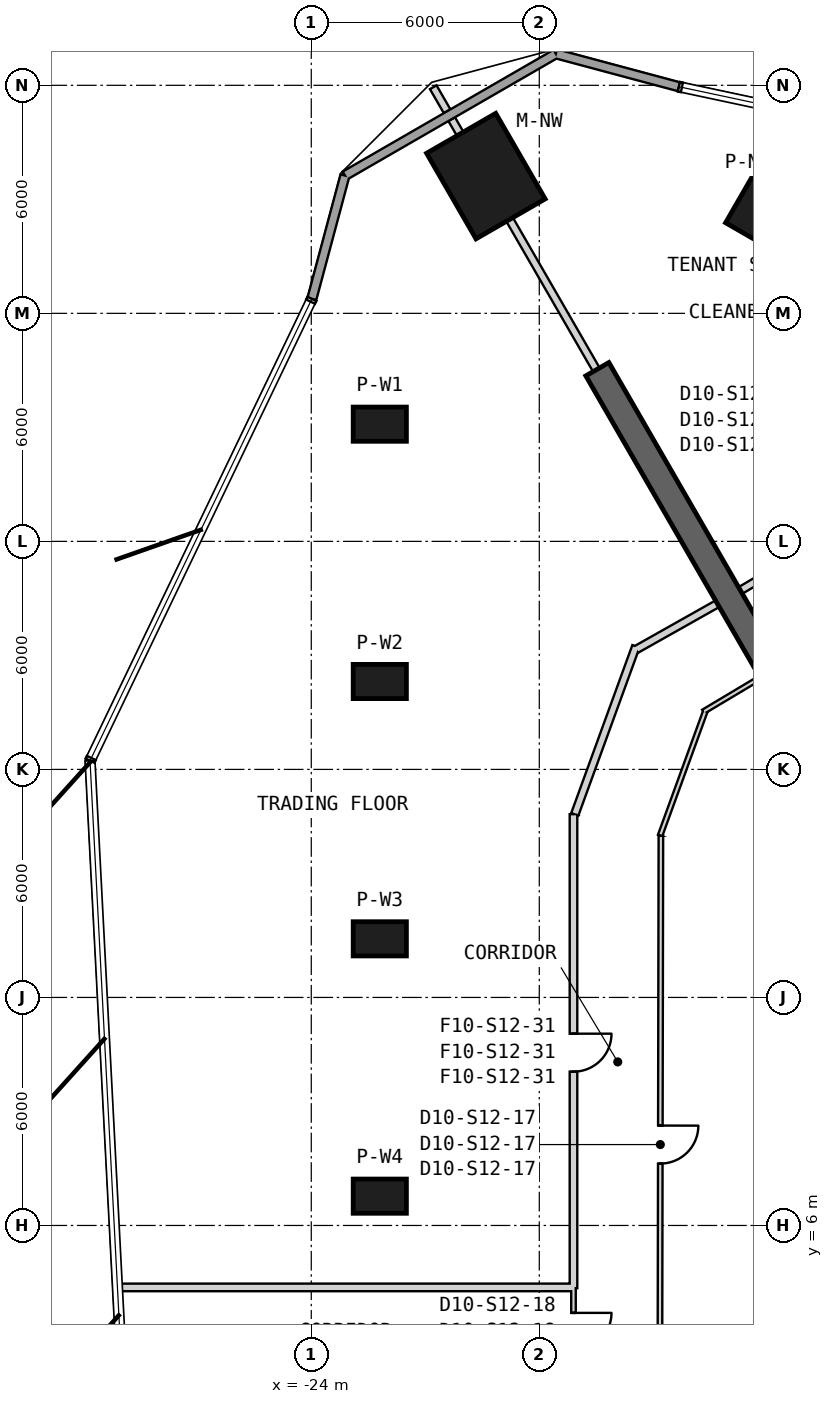
"""IFC4 building model, lengths in metres.
Left out: names, types, materials, properties, quantities, classifications, styles, units other than length and angle.
Written with IfcOpenShell. Run it as: python <this file> out.ifc"""

import sys

from ifc_helpers import new_model, si_unit, direction, frame, frame_2d, origin, origin_2d, place, context, subcontext, project, spatial, rectangle, extrude, element, fill, save


model = new_model("IFC4")
c1 = context("Model", 3, precision=1e-05, world=origin(), true_north=direction((0.0, 1.0)))
c2 = subcontext(c1, "Body", "Model", "MODEL_VIEW")
j1 = project(units=[si_unit("LENGTHUNIT", "METRE"), si_unit("PLANEANGLEUNIT", "RADIAN")], contexts=[c1])
p1 = place(None, origin())
s1 = spatial("IfcSite", under=j1, at=p1, CompositionType="ELEMENT")
p2 = place(p1, origin())
s2 = spatial("IfcBuilding", under=s1, at=p2, CompositionType="ELEMENT")
p3 = place(p2, frame((0.0, 0.0, 205.2)))
s3 = spatial("IfcBuildingStorey", under=s2, at=p3, CompositionType="ELEMENT", Elevation=205.2)
p4 = place(p3, frame((-19.406, 33.611, 0.0), z_axis=(0.0, 0.0, 1.0), x_axis=(-0.5, 0.866025403784, 0.0)))
e1 = element("IfcColumn", 1, at=p4, inside=s3, PredefinedType="COLUMN", context=c2, shape_type="SweptSolid", body=[
    extrude(rectangle(XDim=2.6, YDim=2.1, at=origin_2d()), origin(), (0.0, 0.0, 1.0), 4.0),
])
for number, where, z_axis, x_axis in (
    (2, (-22.197, 27.084, 0.0), (0.0, 0.0, 1.0), (-1.0, 0.0, 0.0)),
    (3, (-22.197, 20.313, 0.0), (0.0, 0.0, 1.0), (-1.0, 0.0, 0.0)),
    (4, (-22.197, 13.542, 0.0), (0.0, 0.0, 1.0), (-1.0, 0.0, 0.0)),
    (5, (-22.197, 6.771, 0.0), (0.0, 0.0, 1.0), (-1.0, 0.0, 0.0)),
    (6, (-12.357, 32.765, 0.0), (0.0, 0.0, 1.0), (0.5, 0.866, 0.0)),
):
    element("IfcColumn", number, at=place(p3, frame(where, z_axis=z_axis, x_axis=x_axis)), inside=s3, PredefinedType="COLUMN", context=c2, shape_type="SweptSolid", body=[
        extrude(rectangle(XDim=1.4, YDim=0.9, at=origin_2d()), origin(), (0.0, 0.0, 1.0), 4.0),
    ])
p5 = place(p3, frame((-10.575, 18.316, 0.0), z_axis=(0.0, 0.0, 1.0), x_axis=(-0.499999598486, 0.866025635599, 0.0)))
e7 = element("IfcWall", 7, at=p5, inside=s3, PredefinedType="SHEAR", context=c2, shape_type="SweptSolid", body=[
    extrude(rectangle(XDim=11.794, YDim=0.7, at=frame_2d((5.897, 0.0))), origin(), (0.0, 0.0, 1.0), 4.0),
])
p6 = place(p3, frame((-14.326, 35.963, 0.0), z_axis=(0.0, 0.0, 1.0), x_axis=(-0.965927247937, 0.258813739382, 0.0)))
e8 = element("IfcWall", 8, at=p6, inside=s3, PredefinedType="SOLIDWALL", context=c2, shape_type="SweptSolid", body=[
    extrude(rectangle(XDim=3.353, YDim=0.24, at=frame_2d((1.676, 0.0))), origin(), (0.0, 0.0, 1.0), 3.7),
])
p7 = place(p3, frame((-17.564, 36.831, 0.0), z_axis=(0.0, 0.0, 1.0), x_axis=(-0.86602381473, -0.500002752313, 0.0)))
e9 = element("IfcWall", 9, at=p7, inside=s3, PredefinedType="SOLIDWALL", context=c2, shape_type="SweptSolid", body=[
    extrude(rectangle(XDim=6.409, YDim=0.24, at=frame_2d((3.204, 0.0))), origin(), (0.0, 0.0, 1.0), 3.7),
])
p8 = place(p3, frame((-23.114, 33.626, 0.0), z_axis=(0.0, 0.0, 1.0), x_axis=(-0.258824439285, -0.965924380906, 0.0)))
e10 = element("IfcWall", 10, at=p8, inside=s3, PredefinedType="SOLIDWALL", context=c2, shape_type="SweptSolid", body=[
    extrude(rectangle(XDim=3.361, YDim=0.24, at=frame_2d((1.68, 0.0))), origin(), (0.0, 0.0, 1.0), 3.7),
])
p9 = place(p3, frame((-12.189, 20.411, 0.0), z_axis=(0.0, 0.0, 1.0), x_axis=(-0.858492721014, -0.51282574815, 0.0)))
e11 = element("IfcWall", 11, at=p9, inside=s3, PredefinedType="PARTITIONING", context=c2, shape_type="SweptSolid", body=[
    extrude(rectangle(XDim=1.742, YDim=0.12, at=frame_2d((0.871, 0.0))), origin(), (0.0, 0.0, 1.0), 3.7),
])
p10 = place(p3, frame((-13.631, 19.53, 0.0), z_axis=(0.0, 0.0, 1.0), x_axis=(-0.342069878069, -0.939674517329, 0.0)))
e12 = element("IfcWall", 12, at=p10, inside=s3, PredefinedType="PARTITIONING", context=c2, shape_type="SweptSolid", body=[
    extrude(rectangle(XDim=3.479, YDim=0.12, at=frame_2d((1.739, 0.0))), origin(), (0.0, 0.0, 1.0), 2.78),
])
p11 = place(p3, frame((-14.8, 16.257, 0.0), z_axis=(0.0, 0.0, 1.0), x_axis=(-0.001847148781, -0.999998294019, 0.0)))
e13 = element("IfcWall", 13, at=p11, inside=s3, PredefinedType="PARTITIONING", context=c2, shape_type="SweptSolid", body=[
    extrude(rectangle(XDim=16.257, YDim=0.12, at=frame_2d((8.128, 0.0))), origin(), (0.0, 0.0, 1.0), 2.88),
])
p12 = place(p11, frame((7.629, 0.0, 0.0)))
e14 = element("IfcOpeningElement", 14, at=p12, cuts=e13, PredefinedType="OPENING", context=c2, shape_type="SweptSolid", body=[
    extrude(rectangle(XDim=1.0, YDim=2.1, at=frame_2d((0.5, 1.05))), frame((0.0, 0.07, 0.0), z_axis=(0.0, -1.0, 0.0), x_axis=(1.0, 0.0, 0.0)), (0.0, 0.0, 1.0), 0.14),
])
p13 = place(p3, frame((-17.1, 4.35, 0.0), z_axis=(0.0, 0.0, 1.0), x_axis=(0.0, -1.0, 0.0)))
e15 = element("IfcWall", 15, at=p13, inside=s3, PredefinedType="PARTITIONING", context=c2, shape_type="SweptSolid", body=[
    extrude(rectangle(XDim=2.3, YDim=0.12, at=frame_2d((1.15, 0.0))), origin(), (0.0, 0.0, 1.0), 3.7),
])
p14 = place(p13, frame((0.65, 0.0, 0.0)))
e16 = element("IfcOpeningElement", 16, at=p14, cuts=e15, PredefinedType="OPENING", context=c2, shape_type="SweptSolid", body=[
    extrude(rectangle(XDim=1.0, YDim=2.1, at=frame_2d((0.5, 1.05))), frame((0.0, 0.07, 0.0), z_axis=(0.0, -1.0, 0.0), x_axis=(1.0, 0.0, 0.0)), (0.0, 0.0, 1.0), 0.14),
])
p15 = place(p3, frame((-17.1, 16.823, 0.0), z_axis=(0.0, 0.0, 1.0), x_axis=(0.0, -1.0, 0.0)))
e17 = element("IfcWall", 17, at=p15, inside=s3, PredefinedType="PARTITIONING", context=c2, shape_type="SweptSolid", body=[
    extrude(rectangle(XDim=12.473, YDim=0.2, at=frame_2d((6.236, 0.0))), origin(), (0.0, 0.0, 1.0), 2.88),
])
p16 = place(p15, frame((5.776, 0.0, 0.0)))
e18 = element("IfcOpeningElement", 18, at=p16, cuts=e17, PredefinedType="OPENING", context=c2, shape_type="SweptSolid", body=[
    extrude(rectangle(XDim=1.0, YDim=2.1, at=frame_2d((0.5, 1.05))), frame((0.0, 0.11, 0.0), z_axis=(0.0, -1.0, 0.0), x_axis=(1.0, 0.0, 0.0)), (0.0, 0.0, 1.0), 0.22),
])
p17 = place(p3, frame((-15.456, 21.239, 0.0), z_axis=(0.0, 0.0, 1.0), x_axis=(-0.34205546997, -0.939679762187, 0.0)))
e19 = element("IfcWall", 19, at=p17, inside=s3, PredefinedType="PARTITIONING", context=c2, shape_type="SweptSolid", body=[
    extrude(rectangle(XDim=4.706, YDim=0.2, at=frame_2d((2.353, 0.0))), origin(), (0.0, 0.0, 1.0), 2.78),
])
p18 = place(p3, frame((-13.313, 22.359, 0.0), z_axis=(0.0, 0.0, 1.0), x_axis=(-0.87121710687, -0.490897904555, 0.0)))
e20 = element("IfcWall", 20, at=p18, inside=s3, PredefinedType="PARTITIONING", context=c2, shape_type="SweptSolid", body=[
    extrude(rectangle(XDim=2.457, YDim=0.2, at=frame_2d((1.229, 0.0))), origin(), (0.0, 0.0, 1.0), 3.7),
])
p19 = place(p3, frame((-10.55, 23.985, 0.0), z_axis=(0.0, 0.0, 1.0), x_axis=(-0.860742216303, -0.509041095663, 0.0)))
e21 = element("IfcWall", 21, at=p19, inside=s3, PredefinedType="PARTITIONING", context=c2, shape_type="SweptSolid", body=[
    extrude(rectangle(XDim=2.506, YDim=0.2, at=frame_2d((1.253, 0.0))), origin(), (0.0, 0.0, 1.0), 3.7),
])
p20 = place(p3, frame((-17.16, 4.37, 0.0), z_axis=(0.0, 0.0, 1.0), x_axis=(-1.0, 0.0, 0.0)))
e22 = element("IfcWall", 22, at=p20, inside=s3, PredefinedType="PARTITIONING", context=c2, shape_type="SweptSolid", body=[
    extrude(rectangle(XDim=11.94, YDim=0.2, at=frame_2d((5.97, 0.0))), origin(), (0.0, 0.0, 1.0), 3.7),
])
p21 = place(p3, frame((-16.498, 28.515, 0.0), z_axis=(0.0, 0.0, 1.0), x_axis=(-0.499997018584, 0.866027125099, 0.0)))
e23 = element("IfcWall", 23, at=p21, inside=s3, PredefinedType="PARTITIONING", context=c2, shape_type="SweptSolid", body=[
    extrude(rectangle(XDim=4.567, YDim=0.2, at=frame_2d((2.283, 0.0))), origin(), (0.0, 0.0, 1.0), 3.27),
])
p22 = place(p3, frame((-20.082, 34.722, 0.0), z_axis=(0.0, 0.0, 1.0), x_axis=(-0.500132045864, 0.865949153646, 0.0)))
e24 = element("IfcWall", 24, at=p22, inside=s3, PredefinedType="PARTITIONING", context=c2, shape_type="SweptSolid", body=[
    extrude(rectangle(XDim=0.447, YDim=0.2, at=frame_2d((0.224, 0.0))), origin(), (0.0, 0.0, 1.0), 3.7),
])
p23 = place(p3, frame((-20.425, 35.317, 0.0), z_axis=(0.0, 0.0, 1.0), x_axis=(-0.499876722092, 0.86609656662, 0.0)))
e25 = element("IfcWall", 25, at=p23, inside=s3, PredefinedType="PARTITIONING", context=c2, shape_type="SweptSolid", body=[
    extrude(rectangle(XDim=0.731, YDim=0.2, at=frame_2d((0.365, 0.0))), origin(), (0.0, 0.0, 1.0), 3.7),
])
p24 = place(p12, origin())
e26 = element("IfcDoor", 26, at=p24, inside=s3, OperationType="SINGLE_SWING_LEFT", PredefinedType="NOTDEFINED", context=c2, shape_type="SweptSolid", body=[
    extrude(rectangle(XDim=1.0, YDim=2.1, at=frame_2d((0.5, 1.05))), frame((0.0, 0.025, 0.0), z_axis=(0.0, -1.0, 0.0), x_axis=(1.0, 0.0, 0.0)), (0.0, 0.0, 1.0), 0.05),
])
fill(e14, e26)
p25 = place(p14, origin())
e27 = element("IfcDoor", 27, at=p25, inside=s3, OperationType="SINGLE_SWING_LEFT", PredefinedType="NOTDEFINED", context=c2, shape_type="SweptSolid", body=[
    extrude(rectangle(XDim=1.0, YDim=2.1, at=frame_2d((0.5, 1.05))), frame((0.0, 0.025, 0.0), z_axis=(0.0, -1.0, 0.0), x_axis=(1.0, 0.0, 0.0)), (0.0, 0.0, 1.0), 0.05),
])
fill(e16, e27)
p26 = place(p16, origin())
e28 = element("IfcDoor", 28, at=p26, inside=s3, OperationType="SINGLE_SWING_RIGHT", PredefinedType="USERDEFINED", context=c2, shape_type="SweptSolid", body=[
    extrude(rectangle(XDim=1.0, YDim=2.1, at=frame_2d((0.5, 1.05))), frame((0.0, 0.025, 0.0), z_axis=(0.0, -1.0, 0.0), x_axis=(1.0, 0.0, 0.0)), (0.0, 0.0, 1.0), 0.05),
])
fill(e18, e28)
save(model, sys.argv[1])
